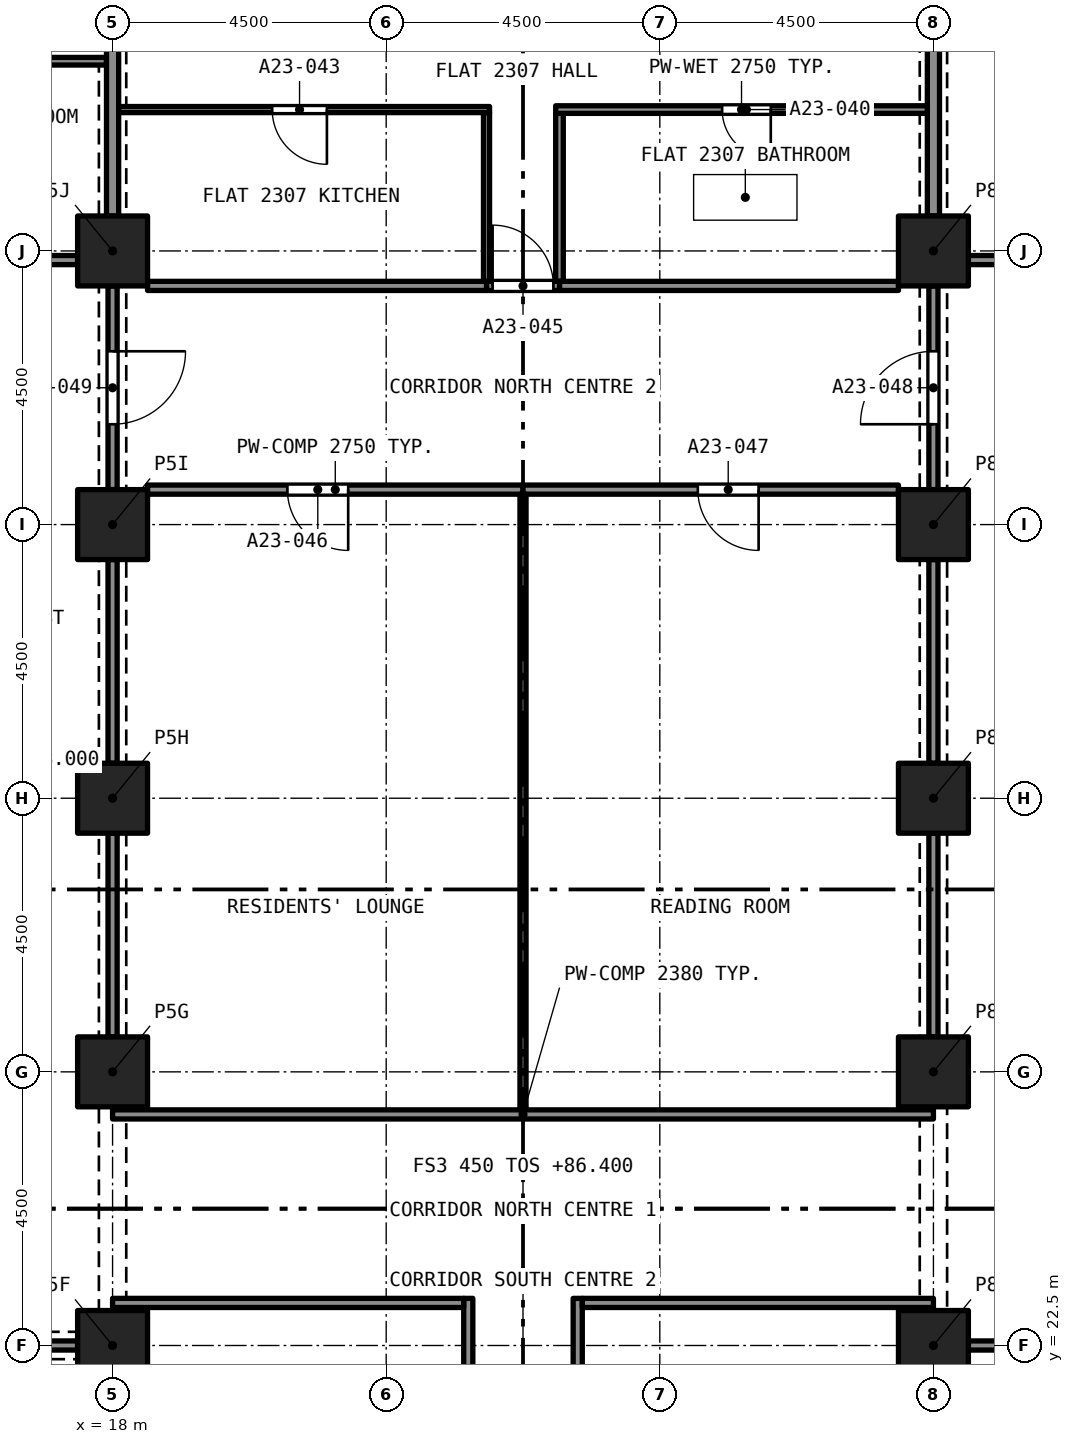
"""IFC4 building model, lengths in metres.
Left out: names, types, materials, properties, quantities, classifications, styles, units other than length and angle.
Written with IfcOpenShell. Run it as: python <this file> out.ifc"""

import sys

from ifc_helpers import new_model, si_unit, direction, frame, frame_2d, origin, origin_2d, place, context, subcontext, project, spatial, rectangle, extrude, element, fill, save


model = new_model("IFC4")
c1 = context("Model", 3, precision=1e-05, world=origin(), true_north=direction((0.0, 1.0)))
c2 = subcontext(c1, "Body", "Model", "MODEL_VIEW")
j1 = project(units=[si_unit("LENGTHUNIT", "METRE"), si_unit("PLANEANGLEUNIT", "RADIAN")], contexts=[c1])
p1 = place(None, origin())
s1 = spatial("IfcSite", under=j1, at=p1, CompositionType="ELEMENT")
p2 = place(p1, origin())
s2 = spatial("IfcBuilding", under=s1, at=p2, CompositionType="ELEMENT")
p3 = place(p2, frame((0.0, 0.0, 86.4)))
s3 = spatial("IfcBuildingStorey", under=s2, at=p3, CompositionType="ELEMENT", Elevation=86.4)
for number, where, z_axis, x_axis in (
    (1, (18.0, 22.5, 0.0), (0.0, 0.0, 1.0), (1.0, 0.0, 0.0)),
    (2, (31.5, 22.5, 0.0), (0.0, 0.0, 1.0), (1.0, 0.0, 0.0)),
    (3, (18.0, 27.0, 0.0), (0.0, 0.0, 1.0), (1.0, 0.0, 0.0)),
    (4, (31.5, 27.0, 0.0), (0.0, 0.0, 1.0), (1.0, 0.0, 0.0)),
    (5, (18.0, 31.5, 0.0), (0.0, 0.0, 1.0), (1.0, 0.0, 0.0)),
    (6, (31.5, 31.5, 0.0), (0.0, 0.0, 1.0), (1.0, 0.0, 0.0)),
    (7, (18.0, 36.0, 0.0), (0.0, 0.0, 1.0), (1.0, 0.0, 0.0)),
    (8, (31.5, 36.0, 0.0), (0.0, 0.0, 1.0), (1.0, 0.0, 0.0)),
    (9, (18.0, 40.5, 0.0), (0.0, 0.0, 1.0), (1.0, 0.0, 0.0)),
    (10, (31.5, 40.5, 0.0), (0.0, 0.0, 1.0), (1.0, 0.0, 0.0)),
):
    element("IfcColumn", number, at=place(p3, frame(where, z_axis=z_axis, x_axis=x_axis)), inside=s3, PredefinedType="COLUMN", context=c2, shape_type="SweptSolid", body=[
        extrude(rectangle(XDim=1.15, YDim=1.15, at=origin_2d()), origin(), (0.0, 0.0, 1.0), 3.2),
    ])
p4 = place(p3, frame((17.9, 43.62, 0.0), z_axis=(0.0, 0.0, 1.0), x_axis=(-1.0, 0.0, 0.0)))
e11 = element("IfcWall", 11, at=p4, inside=s3, PredefinedType="PARTITIONING", context=c2, shape_type="SweptSolid", body=[
    extrude(rectangle(XDim=4.437, YDim=0.125, at=frame_2d((2.219, 0.0))), origin(), (0.0, 0.0, 1.0), 2.9),
])
p5 = place(p4, frame((1.769, 0.0, 0.0)))
e12 = element("IfcOpeningElement", 12, at=p5, cuts=e11, PredefinedType="OPENING", context=c2, shape_type="SweptSolid", body=[
    extrude(rectangle(XDim=0.8, YDim=2.1, at=frame_2d((0.4, 1.05))), frame((0.0, 0.073, 0.0), z_axis=(0.0, -1.0, 0.0), x_axis=(1.0, 0.0, 0.0)), (0.0, 0.0, 1.0), 0.145),
])
p6 = place(p3, frame((18.0, 41.075, 0.0), z_axis=(0.0, 0.0, 1.0), x_axis=(0.0, 1.0, 0.0)))
e13 = element("IfcWall", 13, at=p6, inside=s3, PredefinedType="PARTITIONING", context=c2, shape_type="SweptSolid", body=[
    extrude(rectangle(XDim=3.22, YDim=0.2, at=frame_2d((1.61, 0.0))), origin(), (0.0, 0.0, 1.0), 2.38),
])
p7 = place(p3, frame((13.4, 40.35, 0.0), z_axis=(0.0, 0.0, 1.0), x_axis=(1.0, 0.0, 0.0)))
e14 = element("IfcWall", 14, at=p7, inside=s3, PredefinedType="PARTITIONING", context=c2, shape_type="SweptSolid", body=[
    extrude(rectangle(XDim=4.025, YDim=0.15, at=frame_2d((2.012, 0.0))), origin(), (0.0, 0.0, 1.0), 2.9),
])
p8 = place(p3, frame((31.5, 41.075, 0.0), z_axis=(0.0, 0.0, 1.0), x_axis=(0.0, 1.0, 0.0)))
e15 = element("IfcWall", 15, at=p8, inside=s3, PredefinedType="PARTITIONING", context=c2, shape_type="SweptSolid", body=[
    extrude(rectangle(XDim=3.22, YDim=0.2, at=frame_2d((1.61, 0.0))), origin(), (0.0, 0.0, 1.0), 2.38),
])
p9 = place(p3, frame((32.075, 40.35, 0.0), z_axis=(0.0, 0.0, 1.0), x_axis=(1.0, 0.0, 0.0)))
e16 = element("IfcWall", 16, at=p9, inside=s3, PredefinedType="PARTITIONING", context=c2, shape_type="SweptSolid", body=[
    extrude(rectangle(XDim=2.275, YDim=0.15, at=frame_2d((1.138, 0.0))), origin(), (0.0, 0.0, 1.0), 2.9),
])
p10 = place(p9, frame((1.145, 0.0, 0.0)))
e17 = element("IfcOpeningElement", 17, at=p10, cuts=e16, PredefinedType="OPENING", context=c2, shape_type="SweptSolid", body=[
    extrude(rectangle(XDim=1.0, YDim=2.1, at=frame_2d((0.5, 1.05))), frame((0.0, 0.085, 0.0), z_axis=(0.0, -1.0, 0.0), x_axis=(1.0, 0.0, 0.0)), (0.0, 0.0, 1.0), 0.17),
])
p11 = place(p3, frame((25.35, 40.0, 0.0), z_axis=(0.0, 0.0, 1.0), x_axis=(0.0, 1.0, 0.0)))
e18 = element("IfcWall", 18, at=p11, inside=s3, PredefinedType="PARTITIONING", context=c2, shape_type="SweptSolid", body=[
    extrude(rectangle(XDim=2.762, YDim=0.125, at=frame_2d((1.381, 0.0))), origin(), (0.0, 0.0, 1.0), 2.75),
])
p12 = place(p3, frame((31.4, 42.825, 0.0), z_axis=(0.0, 0.0, 1.0), x_axis=(-1.0, 0.0, 0.0)))
e19 = element("IfcWall", 19, at=p12, inside=s3, PredefinedType="PARTITIONING", context=c2, shape_type="SweptSolid", body=[
    extrude(rectangle(XDim=6.112, YDim=0.125, at=frame_2d((3.056, 0.0))), origin(), (0.0, 0.0, 1.0), 2.75),
])
p13 = place(p12, frame((2.575, 0.0, 0.0)))
e20 = element("IfcOpeningElement", 20, at=p13, cuts=e19, PredefinedType="OPENING", context=c2, shape_type="SweptSolid", body=[
    extrude(rectangle(XDim=0.8, YDim=2.1, at=frame_2d((0.4, 1.05))), frame((0.0, 0.073, 0.0), z_axis=(0.0, -1.0, 0.0), x_axis=(1.0, 0.0, 0.0)), (0.0, 0.0, 1.0), 0.145),
])
p14 = place(p3, frame((25.35, 39.925, 0.0), z_axis=(0.0, 0.0, 1.0), x_axis=(1.0, 0.0, 0.0)))
e21 = element("IfcWall", 21, at=p14, inside=s3, PredefinedType="PARTITIONING", context=c2, shape_type="SweptSolid", body=[
    extrude(rectangle(XDim=5.575, YDim=0.15, at=frame_2d((2.788, 0.0))), origin(), (0.0, 0.0, 1.0), 2.75),
])
p15 = place(p3, frame((24.15, 40.0, 0.0), z_axis=(0.0, 0.0, 1.0), x_axis=(0.0, 1.0, 0.0)))
e22 = element("IfcWall", 22, at=p15, inside=s3, PredefinedType="PARTITIONING", context=c2, shape_type="SweptSolid", body=[
    extrude(rectangle(XDim=2.775, YDim=0.1, at=frame_2d((1.387, 0.0))), origin(), (0.0, 0.0, 1.0), 2.75),
])
p16 = place(p3, frame((24.2, 42.825, 0.0), z_axis=(0.0, 0.0, 1.0), x_axis=(-1.0, 0.0, 0.0)))
e23 = element("IfcWall", 23, at=p16, inside=s3, PredefinedType="PARTITIONING", context=c2, shape_type="SweptSolid", body=[
    extrude(rectangle(XDim=6.1, YDim=0.1, at=frame_2d((3.05, 0.0))), origin(), (0.0, 0.0, 1.0), 2.75),
])
p17 = place(p16, frame((2.675, 0.0, 0.0)))
e24 = element("IfcOpeningElement", 24, at=p17, cuts=e23, PredefinedType="OPENING", context=c2, shape_type="SweptSolid", body=[
    extrude(rectangle(XDim=0.9, YDim=2.1, at=frame_2d((0.45, 1.05))), frame((0.0, 0.06, 0.0), z_axis=(0.0, -1.0, 0.0), x_axis=(1.0, 0.0, 0.0)), (0.0, 0.0, 1.0), 0.12),
])
p18 = place(p3, frame((24.15, 39.925, 0.0), z_axis=(0.0, 0.0, 1.0), x_axis=(1.0, 0.0, 0.0)))
e25 = element("IfcWall", 25, at=p18, inside=s3, PredefinedType="PARTITIONING", context=c2, shape_type="SweptSolid", body=[
    extrude(rectangle(XDim=1.2, YDim=0.15, at=frame_2d((0.6, 0.0))), origin(), (0.0, 0.0, 1.0), 2.75),
])
p19 = place(p18, frame((0.1, 0.0, 0.0)))
e26 = element("IfcOpeningElement", 26, at=p19, cuts=e25, PredefinedType="OPENING", context=c2, shape_type="SweptSolid", body=[
    extrude(rectangle(XDim=1.0, YDim=2.1, at=frame_2d((0.5, 1.05))), frame((0.0, 0.085, 0.0), z_axis=(0.0, -1.0, 0.0), x_axis=(1.0, 0.0, 0.0)), (0.0, 0.0, 1.0), 0.17),
])
p20 = place(p3, frame((18.575, 39.925, 0.0), z_axis=(0.0, 0.0, 1.0), x_axis=(1.0, 0.0, 0.0)))
e27 = element("IfcWall", 27, at=p20, inside=s3, PredefinedType="PARTITIONING", context=c2, shape_type="SweptSolid", body=[
    extrude(rectangle(XDim=5.575, YDim=0.15, at=frame_2d((2.788, 0.0))), origin(), (0.0, 0.0, 1.0), 2.75),
])
p21 = place(p3, frame((24.75, 36.575, 0.0), z_axis=(0.0, 0.0, 1.0), x_axis=(-1.0, 0.0, 0.0)))
e28 = element("IfcWall", 28, at=p21, inside=s3, PredefinedType="PARTITIONING", context=c2, shape_type="SweptSolid", body=[
    extrude(rectangle(XDim=6.175, YDim=0.15, at=frame_2d((3.087, 0.0))), origin(), (0.0, 0.0, 1.0), 2.75),
])
p22 = place(p21, frame((2.875, 0.0, 0.0)))
e29 = element("IfcOpeningElement", 29, at=p22, cuts=e28, PredefinedType="OPENING", context=c2, shape_type="SweptSolid", body=[
    extrude(rectangle(XDim=1.0, YDim=2.1, at=frame_2d((0.5, 1.05))), frame((0.0, 0.085, 0.0), z_axis=(0.0, -1.0, 0.0), x_axis=(1.0, 0.0, 0.0)), (0.0, 0.0, 1.0), 0.17),
])
p23 = place(p3, frame((30.925, 36.575, 0.0), z_axis=(0.0, 0.0, 1.0), x_axis=(-1.0, 0.0, 0.0)))
e30 = element("IfcWall", 30, at=p23, inside=s3, PredefinedType="PARTITIONING", context=c2, shape_type="SweptSolid", body=[
    extrude(rectangle(XDim=6.175, YDim=0.15, at=frame_2d((3.087, 0.0))), origin(), (0.0, 0.0, 1.0), 2.75),
])
p24 = place(p23, frame((2.3, 0.0, 0.0)))
e31 = element("IfcOpeningElement", 31, at=p24, cuts=e30, PredefinedType="OPENING", context=c2, shape_type="SweptSolid", body=[
    extrude(rectangle(XDim=1.0, YDim=2.1, at=frame_2d((0.5, 1.05))), frame((0.0, 0.085, 0.0), z_axis=(0.0, -1.0, 0.0), x_axis=(1.0, 0.0, 0.0)), (0.0, 0.0, 1.0), 0.17),
])
p25 = place(p3, frame((31.5, 36.575, 0.0), z_axis=(0.0, 0.0, 1.0), x_axis=(0.0, 1.0, 0.0)))
e32 = element("IfcWall", 32, at=p25, inside=s3, PredefinedType="PARTITIONING", context=c2, shape_type="SweptSolid", body=[
    extrude(rectangle(XDim=3.35, YDim=0.15, at=frame_2d((1.675, 0.0))), origin(), (0.0, 0.0, 1.0), 2.38),
])
p26 = place(p25, frame((1.075, 0.0, 0.0)))
e33 = element("IfcOpeningElement", 33, at=p26, cuts=e32, PredefinedType="OPENING", context=c2, shape_type="SweptSolid", body=[
    extrude(rectangle(XDim=1.2, YDim=2.1, at=frame_2d((0.6, 1.05))), frame((0.0, 0.085, 0.0), z_axis=(0.0, -1.0, 0.0), x_axis=(1.0, 0.0, 0.0)), (0.0, 0.0, 1.0), 0.17),
])
p27 = place(p3, frame((18.0, 39.925, 0.0), z_axis=(0.0, 0.0, 1.0), x_axis=(0.0, -1.0, 0.0)))
e34 = element("IfcWall", 34, at=p27, inside=s3, PredefinedType="PARTITIONING", context=c2, shape_type="SweptSolid", body=[
    extrude(rectangle(XDim=3.35, YDim=0.15, at=frame_2d((1.675, 0.0))), origin(), (0.0, 0.0, 1.0), 2.38),
])
p28 = place(p27, frame((1.075, 0.0, 0.0)))
e35 = element("IfcOpeningElement", 35, at=p28, cuts=e34, PredefinedType="OPENING", context=c2, shape_type="SweptSolid", body=[
    extrude(rectangle(XDim=1.2, YDim=2.1, at=frame_2d((0.6, 1.05))), frame((0.0, 0.085, 0.0), z_axis=(0.0, -1.0, 0.0), x_axis=(1.0, 0.0, 0.0)), (0.0, 0.0, 1.0), 0.17),
])
p29 = place(p3, frame((23.85, 17.35, 0.0), z_axis=(0.0, 0.0, 1.0), x_axis=(0.0, 1.0, 0.0)))
e36 = element("IfcWall", 36, at=p29, inside=s3, PredefinedType="PARTITIONING", context=c2, shape_type="SweptSolid", body=[
    extrude(rectangle(XDim=5.925, YDim=0.15, at=frame_2d((2.962, 0.0))), origin(), (0.0, 0.0, 1.0), 2.75),
])
p30 = place(p29, frame((2.462, 0.0, 0.0)))
e37 = element("IfcOpeningElement", 37, at=p30, cuts=e36, PredefinedType="OPENING", context=c2, shape_type="SweptSolid", body=[
    extrude(rectangle(XDim=1.0, YDim=2.1, at=frame_2d((0.5, 1.05))), frame((0.0, 0.085, 0.0), z_axis=(0.0, -1.0, 0.0), x_axis=(1.0, 0.0, 0.0)), (0.0, 0.0, 1.0), 0.17),
])
p31 = place(p3, frame((25.65, 23.275, 0.0), z_axis=(0.0, 0.0, 1.0), x_axis=(0.0, -1.0, 0.0)))
e38 = element("IfcWall", 38, at=p31, inside=s3, PredefinedType="PARTITIONING", context=c2, shape_type="SweptSolid", body=[
    extrude(rectangle(XDim=5.925, YDim=0.15, at=frame_2d((2.962, 0.0))), origin(), (0.0, 0.0, 1.0), 2.75),
])
p32 = place(p31, frame((2.462, 0.0, 0.0)))
e39 = element("IfcOpeningElement", 39, at=p32, cuts=e38, PredefinedType="OPENING", context=c2, shape_type="SweptSolid", body=[
    extrude(rectangle(XDim=1.0, YDim=2.1, at=frame_2d((0.5, 1.05))), frame((0.0, 0.085, 0.0), z_axis=(0.0, -1.0, 0.0), x_axis=(1.0, 0.0, 0.0)), (0.0, 0.0, 1.0), 0.17),
])
p33 = place(p3, frame((24.75, 26.375, 0.0), z_axis=(0.0, 0.0, 1.0), x_axis=(0.0, 1.0, 0.0)))
e40 = element("IfcWall", 40, at=p33, inside=s3, PredefinedType="PARTITIONING", context=c2, shape_type="SweptSolid", body=[
    extrude(rectangle(XDim=10.125, YDim=0.1, at=frame_2d((5.062, 0.0))), origin(), (0.0, 0.0, 1.0), 2.75),
])
for number, where, z_axis, x_axis in (
    (41, (18.0, 27.575, 0.0), (0.0, 0.0, 1.0), (0.0, 1.0, 0.0)),
    (42, (18.0, 32.075, 0.0), (0.0, 0.0, 1.0), (0.0, 1.0, 0.0)),
):
    element("IfcWall", number, at=place(p3, frame(where, z_axis=z_axis, x_axis=x_axis)), inside=s3, PredefinedType="PARTITIONING", context=c2, shape_type="SweptSolid", body=[
        extrude(rectangle(XDim=3.35, YDim=0.15, at=frame_2d((1.675, 0.0))), origin(), (0.0, 0.0, 1.0), 2.38),
    ])
p34 = place(p3, frame((18.0, 26.3, 0.0), z_axis=(0.0, 0.0, 1.0), x_axis=(1.0, 0.0, 0.0)))
e43 = element("IfcWall", 43, at=p34, inside=s3, PredefinedType="PARTITIONING", context=c2, shape_type="SweptSolid", body=[
    extrude(rectangle(XDim=13.5, YDim=0.15, at=frame_2d((6.75, 0.0))), origin(), (0.0, 0.0, 1.0), 2.38),
])
for number, where, z_axis, x_axis in (
    (44, (31.5, 32.075, 0.0), (0.0, 0.0, 1.0), (0.0, 1.0, 0.0)),
    (45, (31.5, 27.575, 0.0), (0.0, 0.0, 1.0), (0.0, 1.0, 0.0)),
):
    element("IfcWall", number, at=place(p3, frame(where, z_axis=z_axis, x_axis=x_axis)), inside=s3, PredefinedType="PARTITIONING", context=c2, shape_type="SweptSolid", body=[
        extrude(rectangle(XDim=3.35, YDim=0.15, at=frame_2d((1.675, 0.0))), origin(), (0.0, 0.0, 1.0), 2.38),
    ])
for number, where, z_axis, x_axis in (
    (46, (18.0, 23.2, 0.0), (0.0, 0.0, 1.0), (1.0, 0.0, 0.0)),
    (47, (25.725, 23.2, 0.0), (0.0, 0.0, 1.0), (1.0, 0.0, 0.0)),
):
    element("IfcWall", number, at=place(p3, frame(where, z_axis=z_axis, x_axis=x_axis)), inside=s3, PredefinedType="PARTITIONING", context=c2, shape_type="SweptSolid", body=[
        extrude(rectangle(XDim=5.775, YDim=0.15, at=frame_2d((2.887, 0.0))), origin(), (0.0, 0.0, 1.0), 2.75),
    ])
p35 = place(p3, frame((32.075, 22.5, 0.0), z_axis=(0.0, 0.0, 1.0), x_axis=(1.0, 0.0, 0.0)))
e48 = element("IfcWall", 48, at=p35, inside=s3, PredefinedType="PARTITIONING", context=c2, shape_type="SweptSolid", body=[
    extrude(rectangle(XDim=9.85, YDim=0.15, at=frame_2d((4.925, 0.0))), origin(), (0.0, 0.0, 1.0), 2.9),
])
p36 = place(p3, frame((14.075, 22.5, 0.0), z_axis=(0.0, 0.0, 1.0), x_axis=(1.0, 0.0, 0.0)))
e49 = element("IfcWall", 49, at=p36, inside=s3, PredefinedType="PARTITIONING", context=c2, shape_type="SweptSolid", body=[
    extrude(rectangle(XDim=3.35, YDim=0.15, at=frame_2d((1.675, 0.0))), origin(), (0.0, 0.0, 1.0), 2.38),
])
p37 = place(p13, origin())
e50 = element("IfcDoor", 50, at=p37, inside=s3, OperationType="SINGLE_SWING_LEFT", PredefinedType="DOOR", context=c2, shape_type="SweptSolid", body=[
    extrude(rectangle(XDim=0.8, YDim=2.1, at=frame_2d((0.4, 1.05))), frame((0.0, 0.025, 0.0), z_axis=(0.0, -1.0, 0.0), x_axis=(1.0, 0.0, 0.0)), (0.0, 0.0, 1.0), 0.05),
])
fill(e20, e50)
p38 = place(p17, origin())
e51 = element("IfcDoor", 51, at=p38, inside=s3, OperationType="SINGLE_SWING_RIGHT", PredefinedType="DOOR", context=c2, shape_type="SweptSolid", body=[
    extrude(rectangle(XDim=0.9, YDim=2.1, at=frame_2d((0.45, 1.05))), frame((0.0, 0.025, 0.0), z_axis=(0.0, -1.0, 0.0), x_axis=(1.0, 0.0, 0.0)), (0.0, 0.0, 1.0), 0.05),
])
fill(e24, e51)
p39 = place(p19, origin())
e52 = element("IfcDoor", 52, at=p39, inside=s3, OperationType="SINGLE_SWING_RIGHT", PredefinedType="DOOR", context=c2, shape_type="SweptSolid", body=[
    extrude(rectangle(XDim=1.0, YDim=2.1, at=frame_2d((0.5, 1.05))), frame((0.0, 0.025, 0.0), z_axis=(0.0, -1.0, 0.0), x_axis=(1.0, 0.0, 0.0)), (0.0, 0.0, 1.0), 0.05),
])
fill(e26, e52)
p40 = place(p22, origin())
e53 = element("IfcDoor", 53, at=p40, inside=s3, OperationType="SINGLE_SWING_RIGHT", PredefinedType="DOOR", context=c2, shape_type="SweptSolid", body=[
    extrude(rectangle(XDim=1.0, YDim=2.1, at=frame_2d((0.5, 1.05))), frame((0.0, 0.025, 0.0), z_axis=(0.0, -1.0, 0.0), x_axis=(1.0, 0.0, 0.0)), (0.0, 0.0, 1.0), 0.05),
])
fill(e29, e53)
p41 = place(p24, origin())
e54 = element("IfcDoor", 54, at=p41, inside=s3, OperationType="SINGLE_SWING_LEFT", PredefinedType="DOOR", context=c2, shape_type="SweptSolid", body=[
    extrude(rectangle(XDim=1.0, YDim=2.1, at=frame_2d((0.5, 1.05))), frame((0.0, 0.025, 0.0), z_axis=(0.0, -1.0, 0.0), x_axis=(1.0, 0.0, 0.0)), (0.0, 0.0, 1.0), 0.05),
])
fill(e31, e54)
p42 = place(p26, origin())
e55 = element("IfcDoor", 55, at=p42, inside=s3, OperationType="SINGLE_SWING_LEFT", PredefinedType="DOOR", context=c2, shape_type="SweptSolid", body=[
    extrude(rectangle(XDim=1.2, YDim=2.1, at=frame_2d((0.6, 1.05))), frame((0.0, 0.025, 0.0), z_axis=(0.0, -1.0, 0.0), x_axis=(1.0, 0.0, 0.0)), (0.0, 0.0, 1.0), 0.05),
])
fill(e33, e55)
p43 = place(p28, origin())
e56 = element("IfcDoor", 56, at=p43, inside=s3, OperationType="SINGLE_SWING_LEFT", PredefinedType="DOOR", context=c2, shape_type="SweptSolid", body=[
    extrude(rectangle(XDim=1.2, YDim=2.1, at=frame_2d((0.6, 1.05))), frame((0.0, 0.025, 0.0), z_axis=(0.0, -1.0, 0.0), x_axis=(1.0, 0.0, 0.0)), (0.0, 0.0, 1.0), 0.05),
])
fill(e35, e56)
save(model, sys.argv[1])
